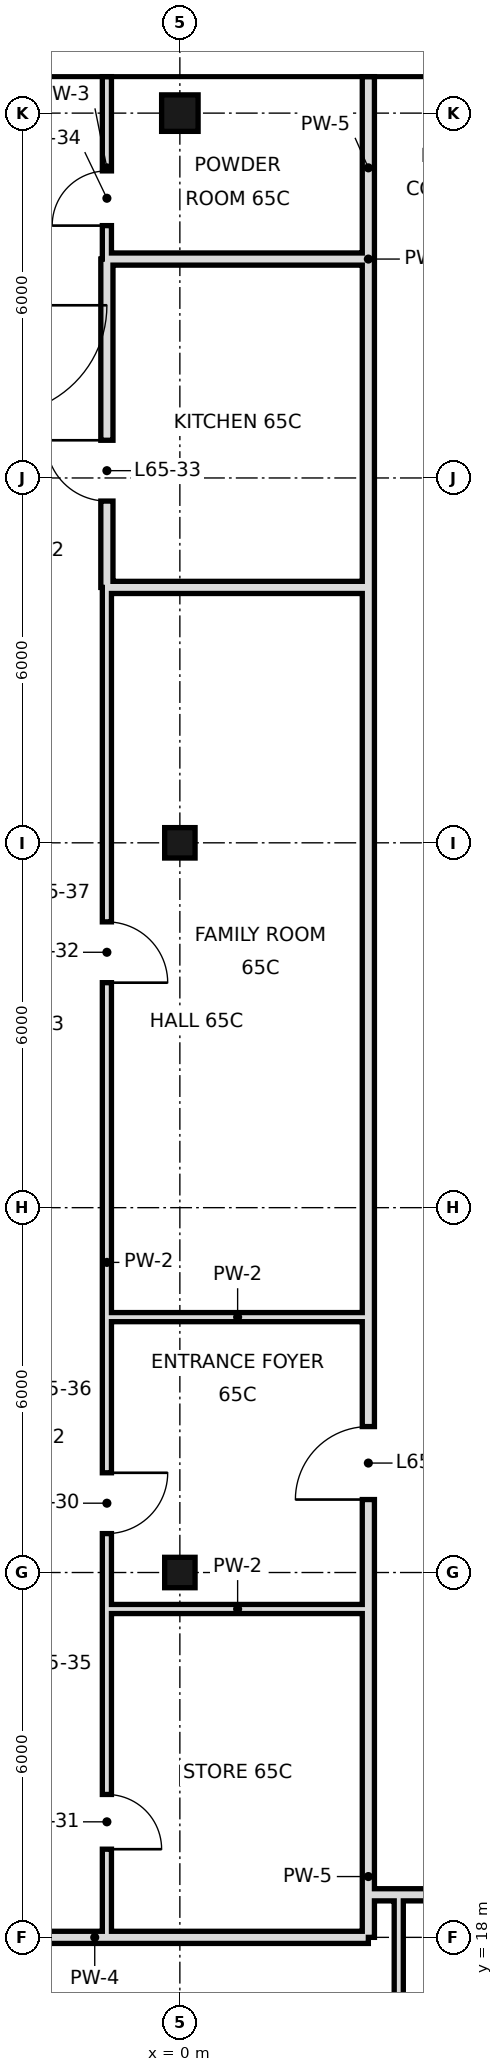
"""IFC4 building model, lengths in metres.
Left out: names, types, materials, properties, quantities, classifications, styles, units other than length and angle.
Written with IfcOpenShell. Run it as: python <this file> out.ifc"""

import sys

from ifc_helpers import new_model, si_unit, direction, frame, frame_2d, origin, origin_2d, place, context, subcontext, project, spatial, rectangle, hollow_rectangle, extrude, element, fill, save


model = new_model("IFC4")
c1 = context("Model", 3, precision=1e-05, world=origin(), true_north=direction((0.0, 1.0)))
c2 = subcontext(c1, "Body", "Model", "MODEL_VIEW")
j1 = project(units=[si_unit("LENGTHUNIT", "METRE"), si_unit("PLANEANGLEUNIT", "RADIAN")], contexts=[c1])
p1 = place(None, origin())
s1 = spatial("IfcSite", under=j1, at=p1, CompositionType="ELEMENT")
p2 = place(p1, origin())
s2 = spatial("IfcBuilding", under=s1, at=p2, CompositionType="ELEMENT")
p3 = place(p2, frame((0.0, 0.0, 273.8)))
s3 = spatial("IfcBuildingStorey", under=s2, at=p3, CompositionType="ELEMENT", Elevation=273.8)
for number, where, z_axis, x_axis in (
    (1, (0.0, 24.0, 0.0), (0.0, 0.0, 1.0), (1.0, 0.0, 0.0)),
    (2, (0.0, 36.0, 0.0), (0.0, 0.0, 1.0), (1.0, 0.0, 0.0)),
):
    element("IfcColumn", number, at=place(p3, frame(where, z_axis=z_axis, x_axis=x_axis)), inside=s3, PredefinedType="COLUMN", context=c2, shape_type="SweptSolid", body=[
        extrude(hollow_rectangle(XDim=0.5, YDim=0.5, WallThickness=0.025, at=origin_2d()), origin(), (0.0, 0.0, 1.0), 3.6),
    ])
p4 = place(p3, frame((0.0, 48.0, 0.0), z_axis=(0.0, 0.0, 1.0), x_axis=(1.0, 0.0, 0.0)))
e3 = element("IfcColumn", 3, at=p4, inside=s3, PredefinedType="COLUMN", context=c2, shape_type="SweptSolid", body=[
    extrude(hollow_rectangle(XDim=0.6, YDim=0.6, WallThickness=0.028, at=origin_2d()), origin(), (0.0, 0.0, 1.0), 3.6),
])
p5 = place(p3, frame((-1.2, 40.2, 0.0), z_axis=(0.0, 0.0, 1.0), x_axis=(0.0, 1.0, 0.0)))
e4 = element("IfcWall", 4, at=p5, inside=s3, PredefinedType="SOLIDWALL", context=c2, shape_type="SweptSolid", body=[
    extrude(rectangle(XDim=5.4, YDim=0.2, at=frame_2d((2.7, 0.0))), origin(), (0.0, 0.0, 1.0), 2.72),
])
p6 = place(p5, frame((1.42, 0.0, 0.0)))
e5 = element("IfcOpeningElement", 5, at=p6, cuts=e4, PredefinedType="OPENING", context=c2, shape_type="SweptSolid", body=[
    extrude(rectangle(XDim=1.0, YDim=2.4, at=frame_2d((0.5, 1.2))), frame((0.0, 0.11, 0.0), z_axis=(0.0, -1.0, 0.0), x_axis=(1.0, 0.0, 0.0)), (0.0, 0.0, 1.0), 0.22),
])
p7 = place(p3, frame((-1.2, 18.0, 0.0), z_axis=(0.0, 0.0, 1.0), x_axis=(0.0, 1.0, 0.0)))
e6 = element("IfcWall", 6, at=p7, inside=s3, PredefinedType="PARTITIONING", context=c2, shape_type="SweptSolid", body=[
    extrude(rectangle(XDim=22.2, YDim=0.15, at=frame_2d((11.1, 0.0))), origin(), (0.0, 0.0, 1.0), 3.42),
])
p8 = place(p7, frame((6.64, 0.0, 0.0)))
e7 = element("IfcOpeningElement", 7, at=p8, cuts=e6, PredefinedType="OPENING", context=c2, shape_type="SweptSolid", body=[
    extrude(rectangle(XDim=1.0, YDim=2.4, at=frame_2d((0.5, 1.2))), frame((0.0, 0.085, 0.0), z_axis=(0.0, -1.0, 0.0), x_axis=(1.0, 0.0, 0.0)), (0.0, 0.0, 1.0), 0.17),
])
p9 = place(p7, frame((1.45, 0.0, 0.0)))
e8 = element("IfcOpeningElement", 8, at=p9, cuts=e6, PredefinedType="OPENING", context=c2, shape_type="SweptSolid", body=[
    extrude(rectangle(XDim=0.9, YDim=2.1, at=frame_2d((0.45, 1.05))), frame((0.0, 0.085, 0.0), z_axis=(0.0, -1.0, 0.0), x_axis=(1.0, 0.0, 0.0)), (0.0, 0.0, 1.0), 0.17),
])
p10 = place(p7, frame((15.7, 0.0, 0.0)))
e9 = element("IfcOpeningElement", 9, at=p10, cuts=e6, PredefinedType="OPENING", context=c2, shape_type="SweptSolid", body=[
    extrude(rectangle(XDim=1.0, YDim=2.4, at=frame_2d((0.5, 1.2))), frame((0.0, 0.085, 0.0), z_axis=(0.0, -1.0, 0.0), x_axis=(1.0, 0.0, 0.0)), (0.0, 0.0, 1.0), 0.17),
])
p11 = place(p3, frame((-1.2, 45.6, 0.0), z_axis=(0.0, 0.0, 1.0), x_axis=(0.0, 1.0, 0.0)))
e10 = element("IfcWall", 10, at=p11, inside=s3, PredefinedType="PARTITIONING", context=c2, shape_type="SweptSolid", body=[
    extrude(rectangle(XDim=3.0, YDim=0.15, at=frame_2d((1.5, 0.0))), origin(), (0.0, 0.0, 1.0), 3.42),
])
p12 = place(p11, frame((0.55, 0.0, 0.0)))
e11 = element("IfcOpeningElement", 11, at=p12, cuts=e10, PredefinedType="OPENING", context=c2, shape_type="SweptSolid", body=[
    extrude(rectangle(XDim=0.9, YDim=2.4, at=frame_2d((0.45, 1.2))), frame((0.0, 0.085, 0.0), z_axis=(0.0, -1.0, 0.0), x_axis=(1.0, 0.0, 0.0)), (0.0, 0.0, 1.0), 0.17),
])
p13 = place(p3, frame((3.1, 18.7, 0.0), z_axis=(0.0, 0.0, 1.0), x_axis=(0.0, 1.0, 0.0)))
e12 = element("IfcWall", 12, at=p13, inside=s3, PredefinedType="SOLIDWALL", context=c2, shape_type="SweptSolid", body=[
    extrude(rectangle(XDim=21.5, YDim=0.2, at=frame_2d((10.75, 0.0))), origin(), (0.0, 0.0, 1.0), 2.97),
])
p14 = place(p13, frame((6.5, 0.0, 0.0)))
e13 = element("IfcOpeningElement", 13, at=p14, cuts=e12, PredefinedType="OPENING", context=c2, shape_type="SweptSolid", body=[
    extrude(rectangle(XDim=1.2, YDim=2.4, at=frame_2d((0.6, 1.2))), frame((0.0, 0.11, 0.0), z_axis=(0.0, -1.0, 0.0), x_axis=(1.0, 0.0, 0.0)), (0.0, 0.0, 1.0), 0.22),
])
p15 = place(p3, frame((3.1, 45.6, 0.0), z_axis=(0.0, 0.0, 1.0), x_axis=(0.0, 1.0, 0.0)))
e14 = element("IfcWall", 14, at=p15, inside=s3, PredefinedType="SOLIDWALL", context=c2, shape_type="SweptSolid", body=[
    extrude(rectangle(XDim=3.0, YDim=0.2, at=frame_2d((1.5, 0.0))), origin(), (0.0, 0.0, 1.0), 2.72),
])
p16 = place(p3, frame((3.1, 40.2, 0.0), z_axis=(0.0, 0.0, 1.0), x_axis=(0.0, 1.0, 0.0)))
e15 = element("IfcWall", 15, at=p16, inside=s3, PredefinedType="SOLIDWALL", context=c2, shape_type="SweptSolid", body=[
    extrude(rectangle(XDim=5.4, YDim=0.2, at=frame_2d((2.7, 0.0))), origin(), (0.0, 0.0, 1.0), 2.97),
])
p17 = place(p3, frame((3.1, 18.0, 0.0), z_axis=(0.0, 0.0, 1.0), x_axis=(0.0, 1.0, 0.0)))
e16 = element("IfcWall", 16, at=p17, inside=s3, PredefinedType="SOLIDWALL", context=c2, shape_type="SweptSolid", body=[
    extrude(rectangle(XDim=0.7, YDim=0.2, at=frame_2d((0.35, 0.0))), origin(), (0.0, 0.0, 1.0), 2.97),
])
p18 = place(p3, frame((3.6, 10.8, 0.0), z_axis=(0.0, 0.0, 1.0), x_axis=(0.0, 1.0, 0.0)))
e17 = element("IfcWall", 17, at=p18, inside=s3, PredefinedType="PARTITIONING", context=c2, shape_type="SweptSolid", body=[
    extrude(rectangle(XDim=7.9, YDim=0.15, at=frame_2d((3.95, 0.0))), origin(), (0.0, 0.0, 1.0), 3.42),
])
p19 = place(p3, frame((-6.6, 18.0, 0.0), z_axis=(0.0, 0.0, 1.0), x_axis=(1.0, 0.0, 0.0)))
e18 = element("IfcWall", 18, at=p19, inside=s3, PredefinedType="SOLIDWALL", context=c2, shape_type="SweptSolid", body=[
    extrude(rectangle(XDim=9.7, YDim=0.2, at=frame_2d((4.85, 0.0))), origin(), (0.0, 0.0, 1.0), 2.72),
])
p20 = place(p3, frame((3.1, 18.7, 0.0), z_axis=(0.0, 0.0, 1.0), x_axis=(1.0, 0.0, 0.0)))
e19 = element("IfcWall", 19, at=p20, inside=s3, PredefinedType="SOLIDWALL", context=c2, shape_type="SweptSolid", body=[
    extrude(rectangle(XDim=20.9, YDim=0.2, at=frame_2d((10.45, 0.0))), origin(), (0.0, 0.0, 1.0), 2.72),
])
p21 = place(p20, frame((14.9, 0.0, 0.0)))
e20 = element("IfcOpeningElement", 20, at=p21, cuts=e19, PredefinedType="OPENING", context=c2, shape_type="SweptSolid", body=[
    extrude(rectangle(XDim=1.2, YDim=2.4, at=frame_2d((0.6, 1.2))), frame((0.0, 0.11, 0.0), z_axis=(0.0, -1.0, 0.0), x_axis=(1.0, 0.0, 0.0)), (0.0, 0.0, 1.0), 0.22),
])
for number, where, z_axis, x_axis in (
    (21, (-1.2, 23.4, 0.0), (0.0, 0.0, 1.0), (1.0, 0.0, 0.0)),
    (22, (-1.2, 28.2, 0.0), (0.0, 0.0, 1.0), (1.0, 0.0, 0.0)),
):
    element("IfcWall", number, at=place(p3, frame(where, z_axis=z_axis, x_axis=x_axis)), inside=s3, PredefinedType="PARTITIONING", context=c2, shape_type="SweptSolid", body=[
        extrude(rectangle(XDim=4.3, YDim=0.15, at=frame_2d((2.15, 0.0))), origin(), (0.0, 0.0, 1.0), 3.42),
    ])
for number, where, z_axis, x_axis in (
    (23, (-1.2, 40.2, 0.0), (0.0, 0.0, 1.0), (1.0, 0.0, 0.0)),
    (24, (-1.2, 45.6, 0.0), (0.0, 0.0, 1.0), (1.0, 0.0, 0.0)),
):
    element("IfcWall", number, at=place(p3, frame(where, z_axis=z_axis, x_axis=x_axis)), inside=s3, PredefinedType="SOLIDWALL", context=c2, shape_type="SweptSolid", body=[
        extrude(rectangle(XDim=4.3, YDim=0.2, at=frame_2d((2.15, 0.0))), origin(), (0.0, 0.0, 1.0), 2.72),
    ])
p22 = place(p8, origin())
e25 = element("IfcDoor", 25, at=p22, inside=s3, OperationType="SINGLE_SWING_RIGHT", PredefinedType="DOOR", context=c2, shape_type="SweptSolid", body=[
    extrude(rectangle(XDim=1.0, YDim=2.4, at=frame_2d((0.5, 1.2))), frame((0.0, 0.025, 0.0), z_axis=(0.0, -1.0, 0.0), x_axis=(1.0, 0.0, 0.0)), (0.0, 0.0, 1.0), 0.05),
])
fill(e7, e25)
p23 = place(p9, frame((0.9, 0.0, 0.0), z_axis=(0.0, 0.0, 1.0), x_axis=(-1.0, 0.0, 0.0)))
e26 = element("IfcDoor", 26, at=p23, inside=s3, OperationType="SINGLE_SWING_RIGHT", PredefinedType="DOOR", context=c2, shape_type="SweptSolid", body=[
    extrude(rectangle(XDim=0.9, YDim=2.1, at=frame_2d((0.45, 1.05))), frame((0.0, 0.025, 0.0), z_axis=(0.0, -1.0, 0.0), x_axis=(1.0, 0.0, 0.0)), (0.0, 0.0, 1.0), 0.05),
])
fill(e8, e26)
p24 = place(p10, frame((1.0, 0.0, 0.0), z_axis=(0.0, 0.0, 1.0), x_axis=(-1.0, 0.0, 0.0)))
e27 = element("IfcDoor", 27, at=p24, inside=s3, OperationType="SINGLE_SWING_RIGHT", PredefinedType="DOOR", context=c2, shape_type="SweptSolid", body=[
    extrude(rectangle(XDim=1.0, YDim=2.4, at=frame_2d((0.5, 1.2))), frame((0.0, 0.025, 0.0), z_axis=(0.0, -1.0, 0.0), x_axis=(1.0, 0.0, 0.0)), (0.0, 0.0, 1.0), 0.05),
])
fill(e9, e27)
p25 = place(p6, frame((1.0, 0.0, 0.0), z_axis=(0.0, 0.0, 1.0), x_axis=(-1.0, 0.0, 0.0)))
e28 = element("IfcDoor", 28, at=p25, inside=s3, OperationType="SINGLE_SWING_LEFT", PredefinedType="DOOR", context=c2, shape_type="SweptSolid", body=[
    extrude(rectangle(XDim=1.0, YDim=2.4, at=frame_2d((0.5, 1.2))), frame((0.0, 0.025, 0.0), z_axis=(0.0, -1.0, 0.0), x_axis=(1.0, 0.0, 0.0)), (0.0, 0.0, 1.0), 0.05),
])
fill(e5, e28)
p26 = place(p12, origin())
e29 = element("IfcDoor", 29, at=p26, inside=s3, OperationType="SINGLE_SWING_LEFT", PredefinedType="DOOR", context=c2, shape_type="SweptSolid", body=[
    extrude(rectangle(XDim=0.9, YDim=2.4, at=frame_2d((0.45, 1.2))), frame((0.0, 0.025, 0.0), z_axis=(0.0, -1.0, 0.0), x_axis=(1.0, 0.0, 0.0)), (0.0, 0.0, 1.0), 0.05),
])
fill(e11, e29)
p27 = place(p14, origin())
e30 = element("IfcDoor", 30, at=p27, inside=s3, OperationType="SINGLE_SWING_LEFT", PredefinedType="DOOR", context=c2, shape_type="SweptSolid", body=[
    extrude(rectangle(XDim=1.2, YDim=2.4, at=frame_2d((0.6, 1.2))), frame((0.0, 0.025, 0.0), z_axis=(0.0, -1.0, 0.0), x_axis=(1.0, 0.0, 0.0)), (0.0, 0.0, 1.0), 0.05),
])
fill(e13, e30)
save(model, sys.argv[1])
